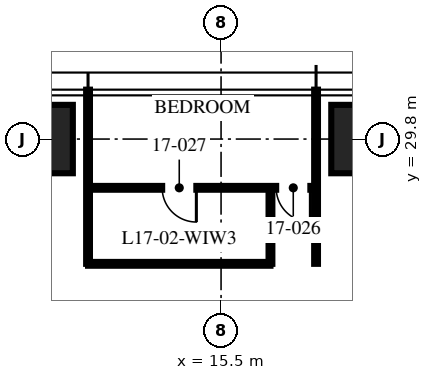
"""IFC4 building model, lengths in metres.
Left out: names, types, materials, properties, quantities, classifications, styles, units other than length and angle.
Written with IfcOpenShell. Run it as: python <this file> out.ifc"""

import sys

from ifc_helpers import new_model, si_unit, direction, frame, frame_2d, origin, origin_2d, place, context, subcontext, project, spatial, rectangle, hollow_rectangle, extrude, element, fill, save


model = new_model("IFC4")
c1 = context("Model", 3, precision=1e-05, world=origin(), true_north=direction((0.0, 1.0)))
c2 = subcontext(c1, "Body", "Model", "MODEL_VIEW")
j1 = project(units=[si_unit("LENGTHUNIT", "METRE"), si_unit("PLANEANGLEUNIT", "RADIAN")], contexts=[c1])
p1 = place(None, origin())
s1 = spatial("IfcSite", under=j1, at=p1, CompositionType="ELEMENT")
p2 = place(p1, origin())
s2 = spatial("IfcBuilding", under=s1, at=p2, CompositionType="ELEMENT")
p3 = place(p2, frame((0.0, 0.0, 69.75)))
s3 = spatial("IfcBuildingStorey", under=s2, at=p3, CompositionType="ELEMENT", Elevation=69.75)
for number, where, z_axis, x_axis in (
    (1, (10.0, 29.8, 0.0), (0.0, 0.0, 1.0), (1.0, 0.0, 0.0)),
    (2, (20.0, 29.8, 0.0), (0.0, 0.0, 1.0), (1.0, 0.0, 0.0)),
):
    element("IfcColumn", number, at=place(p3, frame(where, z_axis=z_axis, x_axis=x_axis)), inside=s3, PredefinedType="COLUMN", context=c2, shape_type="SweptSolid", body=[
        extrude(hollow_rectangle(XDim=3.2, YDim=1.8, WallThickness=0.2, at=origin_2d()), origin(), (0.0, 0.0, 1.0), 3.75),
    ])
for number, where, z_axis, x_axis in (
    (3, (18.0, 26.517, 0.0), (0.0, 0.0, 1.0), (0.0, 1.0, 0.0)),
    (4, (12.0, 26.517, 0.0), (0.0, 0.0, 1.0), (0.0, 1.0, 0.0)),
):
    element("IfcWall", number, at=place(p3, frame(where, z_axis=z_axis, x_axis=x_axis)), inside=s3, PredefinedType="PARTITIONING", context=c2, shape_type="SweptSolid", body=[
        extrude(rectangle(XDim=4.583, YDim=0.1, at=frame_2d((2.292, 0.0))), origin(), (0.0, 0.0, 1.0), 2.71),
    ])
p4 = place(p3, frame((18.0, 28.517, 0.0), z_axis=(0.0, 0.0, 1.0), x_axis=(-1.0, 0.0, 0.0)))
e5 = element("IfcWall", 5, at=p4, inside=s3, PredefinedType="PARTITIONING", context=c2, shape_type="SweptSolid", body=[
    extrude(rectangle(XDim=6.0, YDim=0.1, at=frame_2d((3.0, 0.0))), origin(), (0.0, 0.0, 1.0), 2.61),
])
p5 = place(p4, frame((0.15, 0.0, 0.0)))
e6 = element("IfcOpeningElement", 6, at=p5, cuts=e5, PredefinedType="OPENING", context=c2, shape_type="SweptSolid", body=[
    extrude(rectangle(XDim=0.9, YDim=2.1, at=frame_2d((0.45, 1.05))), frame((0.0, 0.06, 0.0), z_axis=(0.0, -1.0, 0.0), x_axis=(1.0, 0.0, 0.0)), (0.0, 0.0, 1.0), 0.12),
])
p6 = place(p4, frame((3.15, 0.0, 0.0)))
e7 = element("IfcOpeningElement", 7, at=p6, cuts=e5, PredefinedType="OPENING", context=c2, shape_type="SweptSolid", body=[
    extrude(rectangle(XDim=0.9, YDim=2.1, at=frame_2d((0.45, 1.05))), frame((0.0, 0.06, 0.0), z_axis=(0.0, -1.0, 0.0), x_axis=(1.0, 0.0, 0.0)), (0.0, 0.0, 1.0), 0.12),
])
p7 = place(p3, frame((16.8, 26.517, 0.0), z_axis=(0.0, 0.0, 1.0), x_axis=(0.0, 1.0, 0.0)))
e8 = element("IfcWall", 8, at=p7, inside=s3, PredefinedType="PARTITIONING", context=c2, shape_type="SweptSolid", body=[
    extrude(rectangle(XDim=2.0, YDim=0.1, at=frame_2d((1.0, 0.0))), origin(), (0.0, 0.0, 1.0), 3.5),
])
p8 = place(p3, frame((16.8, 26.517, 0.0), z_axis=(0.0, 0.0, 1.0), x_axis=(-1.0, 0.0, 0.0)))
e9 = element("IfcWall", 9, at=p8, inside=s3, PredefinedType="PARTITIONING", context=c2, shape_type="SweptSolid", body=[
    extrude(rectangle(XDim=4.8, YDim=0.1, at=frame_2d((2.4, 0.0))), origin(), (0.0, 0.0, 1.0), 2.61),
])
p9 = place(p5, origin())
e10 = element("IfcDoor", 10, at=p9, inside=s3, OperationType="SINGLE_SWING_LEFT", PredefinedType="DOOR", context=c2, shape_type="SweptSolid", body=[
    extrude(rectangle(XDim=0.9, YDim=2.1, at=frame_2d((0.45, 1.05))), frame((0.0, 0.025, 0.0), z_axis=(0.0, -1.0, 0.0), x_axis=(1.0, 0.0, 0.0)), (0.0, 0.0, 1.0), 0.05),
])
fill(e6, e10)
p10 = place(p6, origin())
e11 = element("IfcDoor", 11, at=p10, inside=s3, OperationType="SINGLE_SWING_LEFT", PredefinedType="DOOR", context=c2, shape_type="SweptSolid", body=[
    extrude(rectangle(XDim=0.9, YDim=2.1, at=frame_2d((0.45, 1.05))), frame((0.0, 0.025, 0.0), z_axis=(0.0, -1.0, 0.0), x_axis=(1.0, 0.0, 0.0)), (0.0, 0.0, 1.0), 0.05),
])
fill(e7, e11)
save(model, sys.argv[1])
